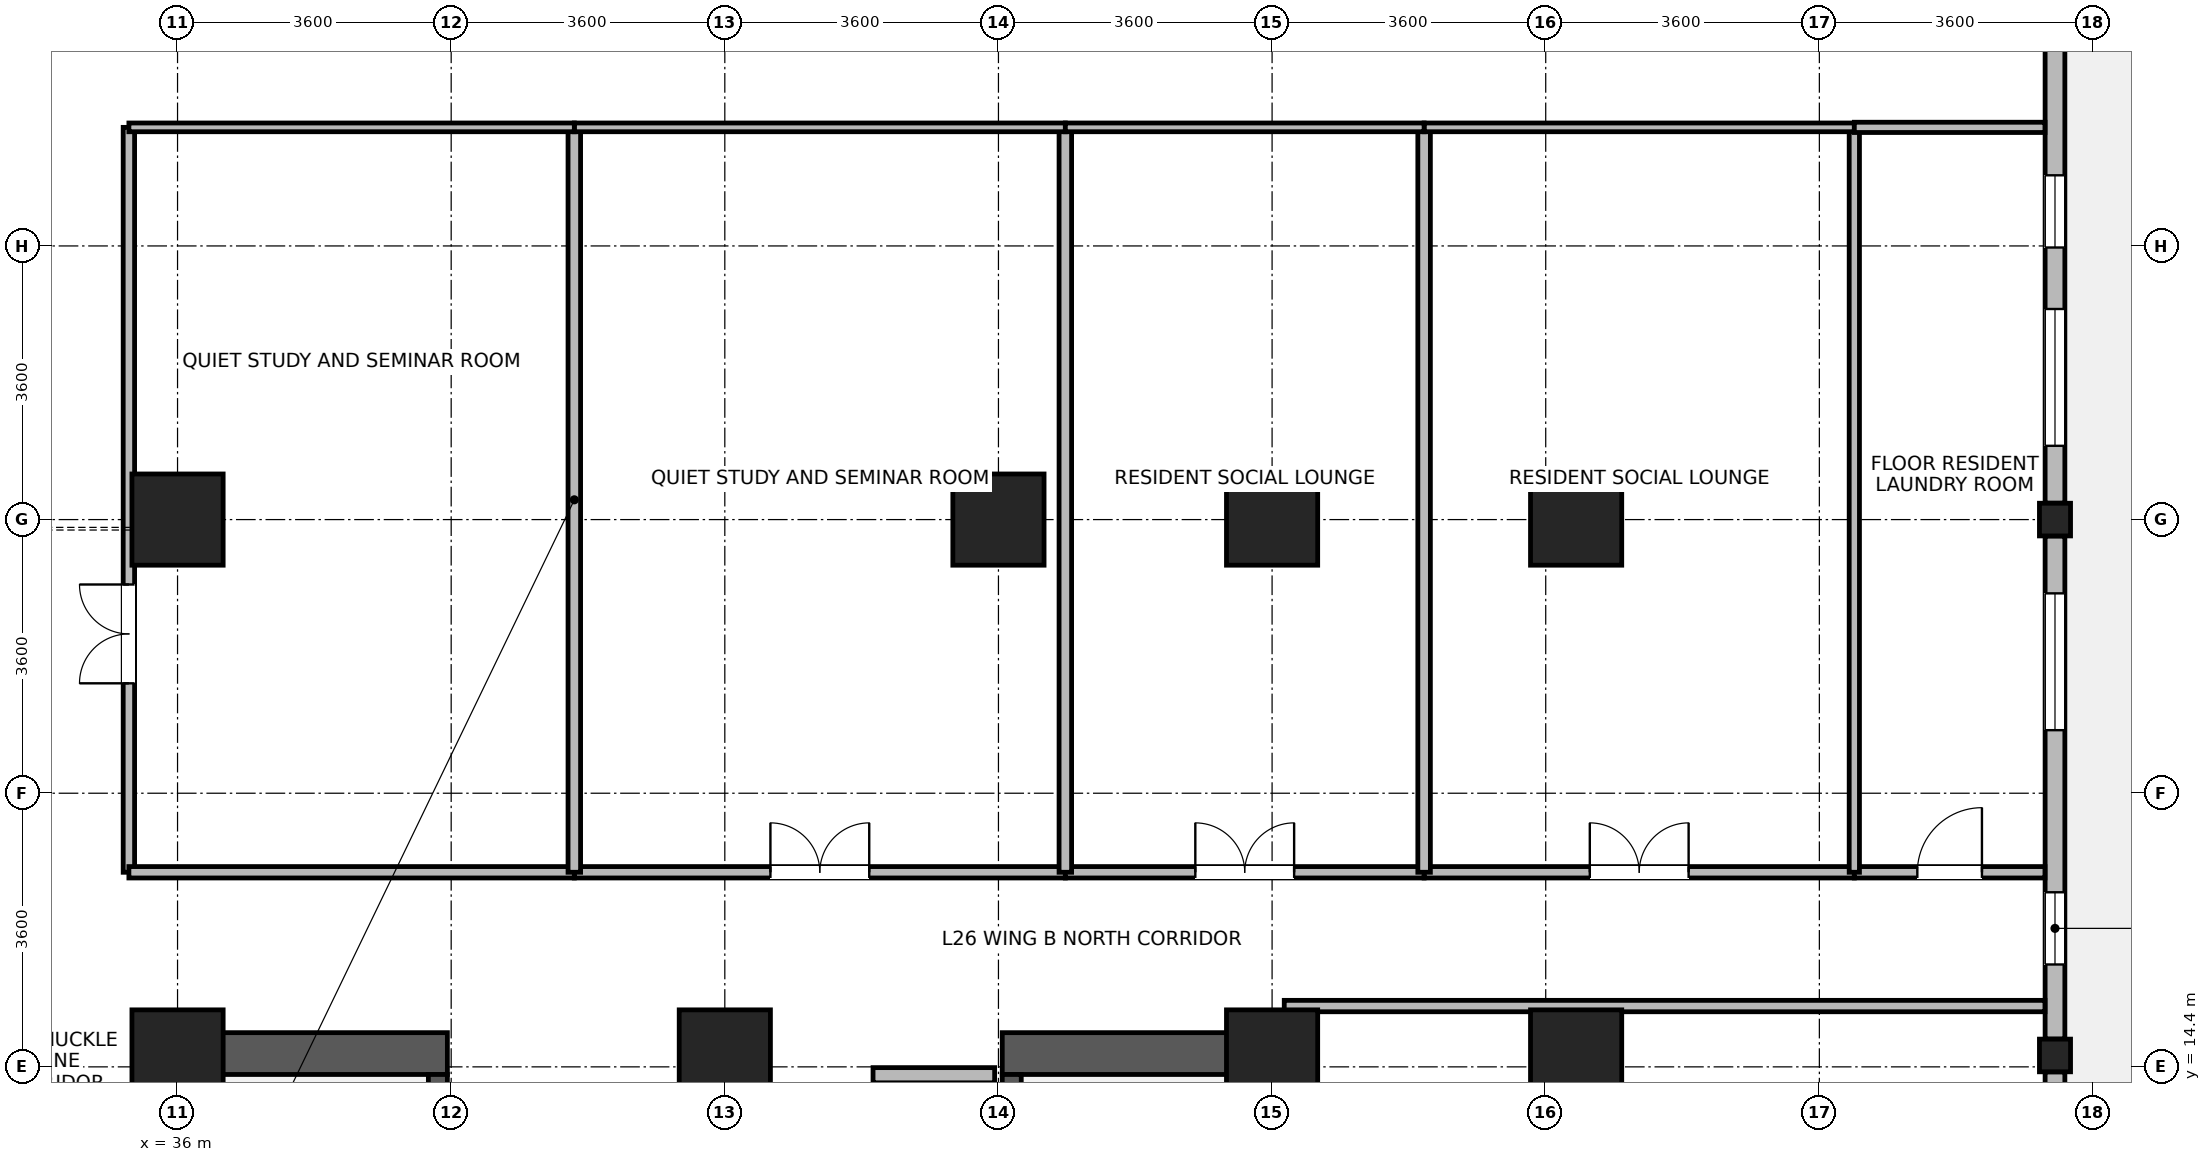
"""IFC4 building model, lengths in metres.
Left out: names, types, materials, properties, quantities, classifications, styles, units other than length and angle.
Written with IfcOpenShell. Run it as: python <this file> out.ifc"""

import sys

from ifc_helpers import new_model, si_unit, direction, frame, frame_2d, origin, origin_2d, place, context, subcontext, project, spatial, rectangle, i_section, extrude, source, transform, mapped, element, fill, save


model = new_model("IFC4")
c1 = context("Model", 3, precision=1e-05, world=origin(), true_north=direction((0.0, 1.0)))
c2 = subcontext(c1, "Body", "Model", "MODEL_VIEW")
j1 = project(units=[si_unit("LENGTHUNIT", "METRE"), si_unit("PLANEANGLEUNIT", "RADIAN")], contexts=[c1])
p1 = place(None, origin())
s1 = spatial("IfcSite", under=j1, at=p1, CompositionType="ELEMENT")
p2 = place(p1, origin())
s2 = spatial("IfcBuilding", under=s1, at=p2, CompositionType="ELEMENT")
p3 = place(p2, frame((0.0, 0.0, 104.5)))
s3 = spatial("IfcBuildingStorey", under=s2, at=p3, CompositionType="ELEMENT", Elevation=104.5)
for number, where, z_axis, x_axis in (
    (1, (36.075, 6.75, 0.0), (0.0, 0.0, 1.0), (0.0, 1.0, 0.0)),
    (2, (50.325, 6.75, 0.0), (0.0, 0.0, 1.0), (0.0, 1.0, 0.0)),
):
    element("IfcWall", number, at=place(p3, frame(where, z_axis=z_axis, x_axis=x_axis)), inside=s3, PredefinedType="SHEAR", context=c2, shape_type="SweptSolid", body=[
        extrude(rectangle(XDim=8.1, YDim=0.55, at=frame_2d((4.05, 0.0))), origin(), (0.0, 0.0, 1.0), 3.45),
    ])
for number, where, z_axis, x_axis in (
    (3, (36.35, 14.575, 0.0), (0.0, 0.0, 1.0), (1.0, 0.0, 0.0)),
    (4, (46.85, 14.575, 0.0), (0.0, 0.0, 1.0), (1.0, 0.0, 0.0)),
):
    element("IfcWall", number, at=place(p3, frame(where, z_axis=z_axis, x_axis=x_axis)), inside=s3, PredefinedType="SHEAR", context=c2, shape_type="SweptSolid", body=[
        extrude(rectangle(XDim=3.2, YDim=0.55, at=frame_2d((1.6, 0.0))), origin(), (0.0, 0.0, 1.0), 3.45),
    ])
p4 = place(p3, frame((39.425, 7.3, 0.0), z_axis=(0.0, 0.0, 1.0), x_axis=(0.0, 1.0, 0.0)))
e5 = element("IfcWall", 5, at=p4, inside=s3, PredefinedType="SHEAR", context=c2, shape_type="SweptSolid", body=[
    extrude(rectangle(XDim=7.0, YDim=0.25, at=frame_2d((3.5, 0.0))), origin(), (0.0, 0.0, 1.0), 3.45),
])
p5 = place(p4, frame((0.15, 0.0, 0.0)))
e6 = element("IfcOpeningElement", 6, at=p5, cuts=e5, PredefinedType="OPENING", context=c2, shape_type="SweptSolid", body=[
    extrude(rectangle(XDim=1.1, YDim=2.08, at=frame_2d((0.55, 1.04))), frame((0.0, 0.135, 0.0), z_axis=(0.0, -1.0, 0.0), x_axis=(1.0, 0.0, 0.0)), (0.0, 0.0, 1.0), 0.27),
])
p6 = place(p3, frame((46.975, 7.3, 0.0), z_axis=(0.0, 0.0, 1.0), x_axis=(0.0, 1.0, 0.0)))
e7 = element("IfcWall", 7, at=p6, inside=s3, PredefinedType="SHEAR", context=c2, shape_type="SweptSolid", body=[
    extrude(rectangle(XDim=7.0, YDim=0.25, at=frame_2d((3.5, 0.0))), origin(), (0.0, 0.0, 1.0), 3.45),
])
p7 = place(p6, frame((0.15, 0.0, 0.0)))
e8 = element("IfcOpeningElement", 8, at=p7, cuts=e7, PredefinedType="OPENING", context=c2, shape_type="SweptSolid", body=[
    extrude(rectangle(XDim=1.1, YDim=2.08, at=frame_2d((0.55, 1.04))), frame((0.0, 0.135, 0.0), z_axis=(0.0, -1.0, 0.0), x_axis=(1.0, 0.0, 0.0)), (0.0, 0.0, 1.0), 0.27),
])
m1 = source(origin(), c2, "Body", "SweptSolid", [
    extrude(rectangle(XDim=1.2, YDim=1.2, at=origin_2d()), origin(), (0.0, 0.0, 1.0), 3.7),
])
for number, where, z_axis, x_axis in (
    (9, (36.0, 21.6, 0.0), (0.0, 0.0, 1.0), (1.0, 0.0, 0.0)),
    (10, (46.8, 21.6, 0.0), (0.0, 0.0, 1.0), (1.0, 0.0, 0.0)),
    (11, (36.0, 14.55, 0.0), (0.0, 0.0, 1.0), (1.0, 0.0, 0.0)),
    (12, (43.2, 14.55, 0.0), (0.0, 0.0, 1.0), (1.0, 0.0, 0.0)),
    (13, (50.4, 14.55, 0.0), (0.0, 0.0, 1.0), (1.0, 0.0, 0.0)),
    (14, (50.4, 21.6, 0.0), (0.0, 0.0, 1.0), (1.0, 0.0, 0.0)),
    (15, (54.4, 14.55, 0.0), (0.0, 0.0, 1.0), (1.0, 0.0, 0.0)),
    (16, (54.4, 21.6, 0.0), (0.0, 0.0, 1.0), (1.0, 0.0, 0.0)),
):
    element("IfcColumn", number, at=place(p3, frame(where, z_axis=z_axis, x_axis=x_axis)), inside=s3, PredefinedType="COLUMN", context=c2, shape_type="MappedRepresentation", body=[
        mapped(m1, transform((0.0, 0.0, 0.0), x_axis=(1.0, 0.0, 0.0), y_axis=(0.0, 1.0, 0.0), z_axis=(0.0, 0.0, 1.0), scale=1.0)),
    ])
m2 = source(origin(), c2, "Body", "SweptSolid", [
    extrude(i_section(OverallWidth=0.409, OverallDepth=0.43, WebThickness=0.024, FlangeThickness=0.033, FilletRadius=0.015, at=origin_2d()), origin(), (0.0, 0.0, 1.0), 3.7),
])
for number, where, z_axis, x_axis in (
    (17, (60.7, 14.55, 0.0), (0.0, 0.0, 1.0), (1.0, 0.0, 0.0)),
    (18, (60.7, 21.6, 0.0), (0.0, 0.0, 1.0), (1.0, 0.0, 0.0)),
):
    element("IfcColumn", number, at=place(p3, frame(where, z_axis=z_axis, x_axis=x_axis)), inside=s3, PredefinedType="COLUMN", context=c2, shape_type="MappedRepresentation", body=[
        mapped(m2, transform((0.0, 0.0, 0.0), x_axis=(1.0, 0.0, 0.0), y_axis=(0.0, 1.0, 0.0), z_axis=(0.0, 0.0, 1.0), scale=1.0)),
    ])
p8 = place(p3, frame((60.7, 14.334, 0.0), z_axis=(0.0, 0.0, 1.0), x_axis=(0.0, -1.0, 0.0)))
e19 = element("IfcWall", 19, at=p8, inside=s3, PredefinedType="STANDARD", context=c2, shape_type="SweptSolid", body=[
    extrude(rectangle(XDim=7.068, YDim=0.26, at=frame_2d((3.534, 0.0))), origin(), (0.0, 0.0, 1.0), 2.98),
])
p9 = place(p8, frame((0.867, 0.0, 0.85)))
e20 = element("IfcOpeningElement", 20, at=p9, cuts=e19, PredefinedType="OPENING", context=c2, shape_type="SweptSolid", body=[
    extrude(rectangle(XDim=1.8, YDim=1.85, at=frame_2d((0.9, 0.925))), frame((0.0, 0.14, 0.0), z_axis=(0.0, -1.0, 0.0), x_axis=(1.0, 0.0, 0.0)), (0.0, 0.0, 1.0), 0.28),
])
p10 = place(p8, frame((4.401, 0.0, 0.85)))
e21 = element("IfcOpeningElement", 21, at=p10, cuts=e19, PredefinedType="OPENING", context=c2, shape_type="SweptSolid", body=[
    extrude(rectangle(XDim=1.8, YDim=1.85, at=frame_2d((0.9, 0.925))), frame((0.0, 0.14, 0.0), z_axis=(0.0, -1.0, 0.0), x_axis=(1.0, 0.0, 0.0)), (0.0, 0.0, 1.0), 0.28),
])
p11 = place(p3, frame((60.7, 21.384, 0.0), z_axis=(0.0, 0.0, 1.0), x_axis=(0.0, -1.0, 0.0)))
e22 = element("IfcWall", 22, at=p11, inside=s3, PredefinedType="STANDARD", context=c2, shape_type="SweptSolid", body=[
    extrude(rectangle(XDim=6.618, YDim=0.26, at=frame_2d((3.309, 0.0))), origin(), (0.0, 0.0, 1.0), 2.98),
])
p12 = place(p11, frame((0.754, 0.0, 0.85)))
e23 = element("IfcOpeningElement", 23, at=p12, cuts=e22, PredefinedType="OPENING", context=c2, shape_type="SweptSolid", body=[
    extrude(rectangle(XDim=1.8, YDim=1.85, at=frame_2d((0.9, 0.925))), frame((0.0, 0.14, 0.0), z_axis=(0.0, -1.0, 0.0), x_axis=(1.0, 0.0, 0.0)), (0.0, 0.0, 1.0), 0.28),
])
p13 = place(p11, frame((4.687, 0.0, 0.85)))
e24 = element("IfcOpeningElement", 24, at=p13, cuts=e22, PredefinedType="OPENING", context=c2, shape_type="SweptSolid", body=[
    extrude(rectangle(XDim=0.95, YDim=1.75, at=frame_2d((0.475, 0.875))), frame((0.0, 0.14, 0.0), z_axis=(0.0, -1.0, 0.0), x_axis=(1.0, 0.0, 0.0)), (0.0, 0.0, 1.0), 0.28),
])
p14 = place(p3, frame((60.7, 28.434, 0.0), z_axis=(0.0, 0.0, 1.0), x_axis=(0.0, -1.0, 0.0)))
e25 = element("IfcWall", 25, at=p14, inside=s3, PredefinedType="STANDARD", context=c2, shape_type="SweptSolid", body=[
    extrude(rectangle(XDim=6.618, YDim=0.26, at=frame_2d((3.309, 0.0))), origin(), (0.0, 0.0, 1.0), 2.98),
])
p15 = place(p14, frame((4.063, 0.0, 0.85)))
e26 = element("IfcOpeningElement", 26, at=p15, cuts=e25, PredefinedType="OPENING", context=c2, shape_type="SweptSolid", body=[
    extrude(rectangle(XDim=1.8, YDim=1.85, at=frame_2d((0.9, 0.925))), frame((0.0, 0.14, 0.0), z_axis=(0.0, -1.0, 0.0), x_axis=(1.0, 0.0, 0.0)), (0.0, 0.0, 1.0), 0.28),
])
p16 = place(p14, frame((2.305, 0.0, 0.85)))
e27 = element("IfcOpeningElement", 27, at=p16, cuts=e25, PredefinedType="OPENING", context=c2, shape_type="SweptSolid", body=[
    extrude(rectangle(XDim=0.95, YDim=1.75, at=frame_2d((0.475, 0.875))), frame((0.0, 0.14, 0.0), z_axis=(0.0, -1.0, 0.0), x_axis=(1.0, 0.0, 0.0)), (0.0, 0.0, 1.0), 0.28),
])
p17 = place(p3, frame((45.15, 14.29, 0.0), z_axis=(0.0, 0.0, 1.0), x_axis=(1.0, 0.0, 0.0)))
e28 = element("IfcWall", 28, at=p17, inside=s3, PredefinedType="PARTITIONING", context=c2, shape_type="SweptSolid", body=[
    extrude(rectangle(XDim=1.6, YDim=0.2, at=frame_2d((0.8, 0.0))), origin(), (0.0, 0.0, 1.0), 2.43),
])
p18 = place(p3, frame((50.56, 15.2, 0.0), z_axis=(0.0, 0.0, 1.0), x_axis=(1.0, 0.0, 0.0)))
e29 = element("IfcWall", 29, at=p18, inside=s3, PredefinedType="PARTITIONING", context=c2, shape_type="SweptSolid", body=[
    extrude(rectangle(XDim=10.008, YDim=0.15, at=frame_2d((5.004, 0.0))), origin(), (0.0, 0.0, 1.0), 3.43),
])
p19 = place(p3, frame((35.36, 16.96, 0.0), z_axis=(0.0, 0.0, 1.0), x_axis=(0.0, 1.0, 0.0)))
e30 = element("IfcWall", 30, at=p19, inside=s3, PredefinedType="PARTITIONING", context=c2, shape_type="SweptSolid", body=[
    extrude(rectangle(XDim=9.8, YDim=0.15, at=frame_2d((4.9, 0.0))), origin(), (0.0, 0.0, 1.0), 3.43),
])
p20 = place(p19, frame((2.486, 0.0, 0.0)))
e31 = element("IfcOpeningElement", 31, at=p20, cuts=e30, PredefinedType="OPENING", context=c2, shape_type="SweptSolid", body=[
    extrude(rectangle(XDim=1.3, YDim=2.12, at=frame_2d((0.65, 1.06))), frame((0.0, 0.085, 0.0), z_axis=(0.0, -1.0, 0.0), x_axis=(1.0, 0.0, 0.0)), (0.0, 0.0, 1.0), 0.17),
])
p21 = place(p3, frame((41.22, 16.96, 0.0), z_axis=(0.0, 0.0, 1.0), x_axis=(1.0, 0.0, 0.0)))
e32 = element("IfcWall", 32, at=p21, inside=s3, PredefinedType="PARTITIONING", context=c2, shape_type="SweptSolid", body=[
    extrude(rectangle(XDim=6.46, YDim=0.15, at=frame_2d((3.23, 0.0))), origin(), (0.0, 0.0, 1.0), 3.43),
])
p22 = place(p21, frame((2.58, 0.0, 0.0)))
e33 = element("IfcOpeningElement", 33, at=p22, cuts=e32, PredefinedType="OPENING", context=c2, shape_type="SweptSolid", body=[
    extrude(rectangle(XDim=1.3, YDim=2.12, at=frame_2d((0.65, 1.06))), frame((0.0, 0.085, 0.0), z_axis=(0.0, -1.0, 0.0), x_axis=(1.0, 0.0, 0.0)), (0.0, 0.0, 1.0), 0.17),
])
p23 = place(p3, frame((35.36, 16.96, 0.0), z_axis=(0.0, 0.0, 1.0), x_axis=(1.0, 0.0, 0.0)))
e34 = element("IfcWall", 34, at=p23, inside=s3, PredefinedType="PARTITIONING", context=c2, shape_type="SweptSolid", body=[
    extrude(rectangle(XDim=5.86, YDim=0.15, at=frame_2d((2.93, 0.0))), origin(), (0.0, 0.0, 1.0), 3.43),
])
p24 = place(p3, frame((52.4, 16.96, 0.0), z_axis=(0.0, 0.0, 1.0), x_axis=(1.0, 0.0, 0.0)))
e35 = element("IfcWall", 35, at=p24, inside=s3, PredefinedType="PARTITIONING", context=c2, shape_type="SweptSolid", body=[
    extrude(rectangle(XDim=5.66, YDim=0.15, at=frame_2d((2.83, 0.0))), origin(), (0.0, 0.0, 1.0), 3.43),
])
p25 = place(p24, frame((2.18, 0.0, 0.0)))
e36 = element("IfcOpeningElement", 36, at=p25, cuts=e35, PredefinedType="OPENING", context=c2, shape_type="SweptSolid", body=[
    extrude(rectangle(XDim=1.3, YDim=2.12, at=frame_2d((0.65, 1.06))), frame((0.0, 0.085, 0.0), z_axis=(0.0, -1.0, 0.0), x_axis=(1.0, 0.0, 0.0)), (0.0, 0.0, 1.0), 0.17),
])
p26 = place(p3, frame((47.68, 16.96, 0.0), z_axis=(0.0, 0.0, 1.0), x_axis=(1.0, 0.0, 0.0)))
e37 = element("IfcWall", 37, at=p26, inside=s3, PredefinedType="PARTITIONING", context=c2, shape_type="SweptSolid", body=[
    extrude(rectangle(XDim=4.72, YDim=0.15, at=frame_2d((2.36, 0.0))), origin(), (0.0, 0.0, 1.0), 3.43),
])
p27 = place(p26, frame((1.71, 0.0, 0.0)))
e38 = element("IfcOpeningElement", 38, at=p27, cuts=e37, PredefinedType="OPENING", context=c2, shape_type="SweptSolid", body=[
    extrude(rectangle(XDim=1.3, YDim=2.12, at=frame_2d((0.65, 1.06))), frame((0.0, 0.085, 0.0), z_axis=(0.0, -1.0, 0.0), x_axis=(1.0, 0.0, 0.0)), (0.0, 0.0, 1.0), 0.17),
])
p28 = place(p3, frame((58.06, 16.96, 0.0), z_axis=(0.0, 0.0, 1.0), x_axis=(1.0, 0.0, 0.0)))
e39 = element("IfcWall", 39, at=p28, inside=s3, PredefinedType="PARTITIONING", context=c2, shape_type="SweptSolid", body=[
    extrude(rectangle(XDim=2.508, YDim=0.15, at=frame_2d((1.254, 0.0))), origin(), (0.0, 0.0, 1.0), 3.43),
])
p29 = place(p28, frame((0.829, 0.0, 0.0)))
e40 = element("IfcOpeningElement", 40, at=p29, cuts=e39, PredefinedType="OPENING", context=c2, shape_type="SweptSolid", body=[
    extrude(rectangle(XDim=0.85, YDim=2.04, at=frame_2d((0.425, 1.02))), frame((0.0, 0.085, 0.0), z_axis=(0.0, -1.0, 0.0), x_axis=(1.0, 0.0, 0.0)), (0.0, 0.0, 1.0), 0.17),
])
for number, where, z_axis, x_axis in (
    (41, (41.22, 16.96, 0.0), (0.0, 0.0, 1.0), (0.0, 1.0, 0.0)),
    (42, (47.68, 16.96, 0.0), (0.0, 0.0, 1.0), (0.0, 1.0, 0.0)),
    (43, (52.4, 16.96, 0.0), (0.0, 0.0, 1.0), (0.0, 1.0, 0.0)),
):
    element("IfcWall", number, at=place(p3, frame(where, z_axis=z_axis, x_axis=x_axis)), inside=s3, PredefinedType="PARTITIONING", context=c2, shape_type="SweptSolid", body=[
        extrude(rectangle(XDim=9.8, YDim=0.165, at=frame_2d((4.9, 0.0))), origin(), (0.0, 0.0, 1.0), 3.43),
    ])
p30 = place(p3, frame((58.06, 16.96, 0.0), z_axis=(0.0, 0.0, 1.0), x_axis=(0.0, 1.0, 0.0)))
e44 = element("IfcWall", 44, at=p30, inside=s3, PredefinedType="PARTITIONING", context=c2, shape_type="SweptSolid", body=[
    extrude(rectangle(XDim=9.8, YDim=0.135, at=frame_2d((4.9, 0.0))), origin(), (0.0, 0.0, 1.0), 3.43),
])
p31 = place(p3, frame((41.22, 26.76, 0.0), z_axis=(0.0, 0.0, 1.0), x_axis=(1.0, 0.0, 0.0)))
e45 = element("IfcWall", 45, at=p31, inside=s3, PredefinedType="PARTITIONING", context=c2, shape_type="SweptSolid", body=[
    extrude(rectangle(XDim=6.46, YDim=0.115, at=frame_2d((3.23, 0.0))), origin(), (0.0, 0.0, 1.0), 3.43),
])
p32 = place(p3, frame((35.36, 26.76, 0.0), z_axis=(0.0, 0.0, 1.0), x_axis=(1.0, 0.0, 0.0)))
e46 = element("IfcWall", 46, at=p32, inside=s3, PredefinedType="PARTITIONING", context=c2, shape_type="SweptSolid", body=[
    extrude(rectangle(XDim=5.86, YDim=0.115, at=frame_2d((2.93, 0.0))), origin(), (0.0, 0.0, 1.0), 3.43),
])
p33 = place(p3, frame((52.4, 26.76, 0.0), z_axis=(0.0, 0.0, 1.0), x_axis=(1.0, 0.0, 0.0)))
e47 = element("IfcWall", 47, at=p33, inside=s3, PredefinedType="PARTITIONING", context=c2, shape_type="SweptSolid", body=[
    extrude(rectangle(XDim=5.66, YDim=0.115, at=frame_2d((2.83, 0.0))), origin(), (0.0, 0.0, 1.0), 3.43),
])
p34 = place(p3, frame((47.68, 26.76, 0.0), z_axis=(0.0, 0.0, 1.0), x_axis=(1.0, 0.0, 0.0)))
e48 = element("IfcWall", 48, at=p34, inside=s3, PredefinedType="PARTITIONING", context=c2, shape_type="SweptSolid", body=[
    extrude(rectangle(XDim=4.72, YDim=0.115, at=frame_2d((2.36, 0.0))), origin(), (0.0, 0.0, 1.0), 3.43),
])
p35 = place(p3, frame((58.06, 26.76, 0.0), z_axis=(0.0, 0.0, 1.0), x_axis=(1.0, 0.0, 0.0)))
e49 = element("IfcWall", 49, at=p35, inside=s3, PredefinedType="PARTITIONING", context=c2, shape_type="SweptSolid", body=[
    extrude(rectangle(XDim=2.508, YDim=0.135, at=frame_2d((1.254, 0.0))), origin(), (0.0, 0.0, 1.0), 3.43),
])
p36 = place(p12, origin())
e50 = element("IfcWindow", 50, at=p36, inside=s3, PartitioningType="SINGLE_PANEL", PredefinedType="WINDOW", context=c2, shape_type="SweptSolid", body=[
    extrude(rectangle(XDim=1.8, YDim=1.85, at=frame_2d((0.9, 0.925))), frame((0.0, 0.03, 0.0), z_axis=(0.0, -1.0, 0.0), x_axis=(1.0, 0.0, 0.0)), (0.0, 0.0, 1.0), 0.06),
])
fill(e23, e50)
p37 = place(p13, origin())
e51 = element("IfcWindow", 51, at=p37, inside=s3, PartitioningType="SINGLE_PANEL", PredefinedType="WINDOW", context=c2, shape_type="SweptSolid", body=[
    extrude(rectangle(XDim=0.95, YDim=1.75, at=frame_2d((0.475, 0.875))), frame((0.0, 0.03, 0.0), z_axis=(0.0, -1.0, 0.0), x_axis=(1.0, 0.0, 0.0)), (0.0, 0.0, 1.0), 0.06),
])
fill(e24, e51)
p38 = place(p15, origin())
e52 = element("IfcWindow", 52, at=p38, inside=s3, PartitioningType="SINGLE_PANEL", PredefinedType="WINDOW", context=c2, shape_type="SweptSolid", body=[
    extrude(rectangle(XDim=1.8, YDim=1.85, at=frame_2d((0.9, 0.925))), frame((0.0, 0.03, 0.0), z_axis=(0.0, -1.0, 0.0), x_axis=(1.0, 0.0, 0.0)), (0.0, 0.0, 1.0), 0.06),
])
fill(e26, e52)
p39 = place(p16, origin())
e53 = element("IfcWindow", 53, at=p39, inside=s3, PartitioningType="SINGLE_PANEL", PredefinedType="WINDOW", context=c2, shape_type="SweptSolid", body=[
    extrude(rectangle(XDim=0.95, YDim=1.75, at=frame_2d((0.475, 0.875))), frame((0.0, 0.03, 0.0), z_axis=(0.0, -1.0, 0.0), x_axis=(1.0, 0.0, 0.0)), (0.0, 0.0, 1.0), 0.06),
])
fill(e27, e53)
p40 = place(p20, origin())
e54 = element("IfcDoor", 54, at=p40, inside=s3, OperationType="DOUBLE_DOOR_SINGLE_SWING", PredefinedType="DOOR", context=c2, shape_type="SweptSolid", body=[
    extrude(rectangle(XDim=1.3, YDim=2.12, at=frame_2d((0.65, 1.06))), frame((0.0, 0.025, 0.0), z_axis=(0.0, -1.0, 0.0), x_axis=(1.0, 0.0, 0.0)), (0.0, 0.0, 1.0), 0.05),
])
fill(e31, e54)
p41 = place(p22, origin())
e55 = element("IfcDoor", 55, at=p41, inside=s3, OperationType="DOUBLE_DOOR_SINGLE_SWING", PredefinedType="DOOR", context=c2, shape_type="SweptSolid", body=[
    extrude(rectangle(XDim=1.3, YDim=2.12, at=frame_2d((0.65, 1.06))), frame((0.0, 0.025, 0.0), z_axis=(0.0, -1.0, 0.0), x_axis=(1.0, 0.0, 0.0)), (0.0, 0.0, 1.0), 0.05),
])
fill(e33, e55)
p42 = place(p25, origin())
e56 = element("IfcDoor", 56, at=p42, inside=s3, OperationType="DOUBLE_DOOR_SINGLE_SWING", PredefinedType="DOOR", context=c2, shape_type="SweptSolid", body=[
    extrude(rectangle(XDim=1.3, YDim=2.12, at=frame_2d((0.65, 1.06))), frame((0.0, 0.025, 0.0), z_axis=(0.0, -1.0, 0.0), x_axis=(1.0, 0.0, 0.0)), (0.0, 0.0, 1.0), 0.05),
])
fill(e36, e56)
p43 = place(p27, origin())
e57 = element("IfcDoor", 57, at=p43, inside=s3, OperationType="DOUBLE_DOOR_SINGLE_SWING", PredefinedType="DOOR", context=c2, shape_type="SweptSolid", body=[
    extrude(rectangle(XDim=1.3, YDim=2.12, at=frame_2d((0.65, 1.06))), frame((0.0, 0.025, 0.0), z_axis=(0.0, -1.0, 0.0), x_axis=(1.0, 0.0, 0.0)), (0.0, 0.0, 1.0), 0.05),
])
fill(e38, e57)
p44 = place(p29, origin())
e58 = element("IfcDoor", 58, at=p44, inside=s3, OperationType="SINGLE_SWING_RIGHT", PredefinedType="DOOR", context=c2, shape_type="SweptSolid", body=[
    extrude(rectangle(XDim=0.85, YDim=2.04, at=frame_2d((0.425, 1.02))), frame((0.0, 0.025, 0.0), z_axis=(0.0, -1.0, 0.0), x_axis=(1.0, 0.0, 0.0)), (0.0, 0.0, 1.0), 0.05),
])
fill(e40, e58)
save(model, sys.argv[1])
